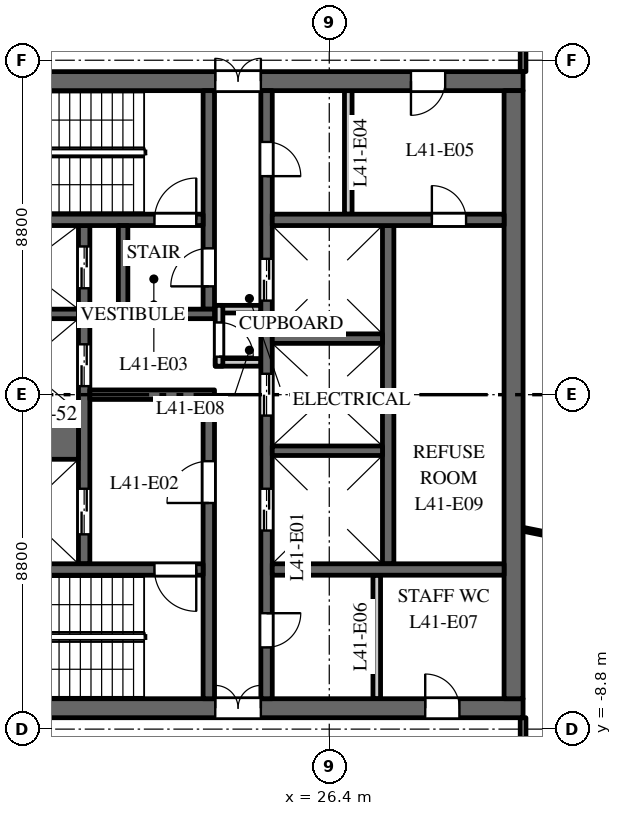
"""IFC4 building model, lengths in metres.
Left out: names, types, materials, properties, quantities, classifications, styles, units other than length and angle.
Written with IfcOpenShell. Run it as: python <this file> out.ifc"""

import sys

from ifc_helpers import new_model, si_unit, direction, frame, frame_2d, origin, place, context, subcontext, project, spatial, rectangle, extrude, element, fill, save


model = new_model("IFC4")
c1 = context("Model", 3, precision=1e-05, world=origin(), true_north=direction((0.0, 1.0)))
c2 = subcontext(c1, "Body", "Model", "MODEL_VIEW")
j1 = project(units=[si_unit("LENGTHUNIT", "METRE"), si_unit("PLANEANGLEUNIT", "RADIAN")], contexts=[c1])
p1 = place(None, origin())
s1 = spatial("IfcSite", under=j1, at=p1, CompositionType="ELEMENT")
p2 = place(p1, origin())
s2 = spatial("IfcBuilding", under=s1, at=p2, CompositionType="ELEMENT")
p3 = place(p2, frame((0.0, 0.0, 178.0)))
s3 = spatial("IfcBuildingStorey", under=s2, at=p3, CompositionType="ELEMENT", Elevation=178.0)
p4 = place(p3, frame((16.5, 8.25, 0.0), z_axis=(0.0, 0.0, 1.0), x_axis=(1.0, 0.0, 0.0)))
e1 = element("IfcWall", 1, at=p4, inside=s3, PredefinedType="SHEAR", context=c2, shape_type="SweptSolid", body=[
    extrude(rectangle(XDim=15.0, YDim=0.5, at=frame_2d((7.5, 0.0))), origin(), (0.0, 0.0, 1.0), 3.7),
])
p5 = place(p4, frame((6.9, 0.0, 0.0)))
e2 = element("IfcOpeningElement", 2, at=p5, cuts=e1, PredefinedType="OPENING", context=c2, shape_type="SweptSolid", body=[
    extrude(rectangle(XDim=1.2, YDim=2.1, at=frame_2d((0.6, 1.05))), frame((0.0, 0.26, 0.0), z_axis=(0.0, -1.0, 0.0), x_axis=(1.0, 0.0, 0.0)), (0.0, 0.0, 1.0), 0.52),
])
p6 = place(p4, frame((12.05, 0.0, 0.0)))
e3 = element("IfcOpeningElement", 3, at=p6, cuts=e1, PredefinedType="OPENING", context=c2, shape_type="SweptSolid", body=[
    extrude(rectangle(XDim=0.9, YDim=2.1, at=frame_2d((0.45, 1.05))), frame((0.0, 0.26, 0.0), z_axis=(0.0, -1.0, 0.0), x_axis=(1.0, 0.0, 0.0)), (0.0, 0.0, 1.0), 0.52),
])
p7 = place(p3, frame((16.5, -8.25, 0.0), z_axis=(0.0, 0.0, 1.0), x_axis=(1.0, 0.0, 0.0)))
e4 = element("IfcWall", 4, at=p7, inside=s3, PredefinedType="SHEAR", context=c2, shape_type="SweptSolid", body=[
    extrude(rectangle(XDim=15.0, YDim=0.5, at=frame_2d((7.5, 0.0))), origin(), (0.0, 0.0, 1.0), 3.7),
])
p8 = place(p7, frame((6.9, 0.0, 0.0)))
e5 = element("IfcOpeningElement", 5, at=p8, cuts=e4, PredefinedType="OPENING", context=c2, shape_type="SweptSolid", body=[
    extrude(rectangle(XDim=1.2, YDim=2.1, at=frame_2d((0.6, 1.05))), frame((0.0, 0.26, 0.0), z_axis=(0.0, -1.0, 0.0), x_axis=(1.0, 0.0, 0.0)), (0.0, 0.0, 1.0), 0.52),
])
p9 = place(p7, frame((12.425, 0.0, 0.0)))
e6 = element("IfcOpeningElement", 6, at=p9, cuts=e4, PredefinedType="OPENING", context=c2, shape_type="SweptSolid", body=[
    extrude(rectangle(XDim=0.9, YDim=2.1, at=frame_2d((0.45, 1.05))), frame((0.0, 0.26, 0.0), z_axis=(0.0, -1.0, 0.0), x_axis=(1.0, 0.0, 0.0)), (0.0, 0.0, 1.0), 0.52),
])
p10 = place(p3, frame((27.95, -4.45, 0.0), z_axis=(0.0, 0.0, 1.0), x_axis=(0.0, 1.0, 0.0)))
e7 = element("IfcWall", 7, at=p10, inside=s3, PredefinedType="SHEAR", context=c2, shape_type="SweptSolid", body=[
    extrude(rectangle(XDim=8.9, YDim=0.3, at=frame_2d((4.45, 0.0))), origin(), (0.0, 0.0, 1.0), 3.7),
])
p11 = place(p3, frame((19.95, -4.45, 0.0), z_axis=(0.0, 0.0, 1.0), x_axis=(0.0, 1.0, 0.0)))
e8 = element("IfcWall", 8, at=p11, inside=s3, PredefinedType="SHEAR", context=c2, shape_type="SweptSolid", body=[
    extrude(rectangle(XDim=8.9, YDim=0.3, at=frame_2d((4.45, 0.0))), origin(), (0.0, 0.0, 1.0), 3.7),
])
p12 = place(p11, frame((0.775, 0.0, 0.0)))
e9 = element("IfcOpeningElement", 9, at=p12, cuts=e8, PredefinedType="OPENING", context=c2, shape_type="SweptSolid", body=[
    extrude(rectangle(XDim=1.2, YDim=2.1, at=frame_2d((0.6, 1.05))), frame((0.0, 0.16, 0.0), z_axis=(0.0, -1.0, 0.0), x_axis=(1.0, 0.0, 0.0)), (0.0, 0.0, 1.0), 0.32),
])
p13 = place(p11, frame((4.675, 0.0, 0.0)))
e10 = element("IfcOpeningElement", 10, at=p13, cuts=e8, PredefinedType="OPENING", context=c2, shape_type="SweptSolid", body=[
    extrude(rectangle(XDim=1.1, YDim=2.1, at=frame_2d((0.55, 1.05))), frame((0.0, 0.16, 0.0), z_axis=(0.0, -1.0, 0.0), x_axis=(1.0, 0.0, 0.0)), (0.0, 0.0, 1.0), 0.32),
])
p14 = place(p11, frame((7.25, 0.0, 0.0)))
e11 = element("IfcOpeningElement", 11, at=p14, cuts=e8, PredefinedType="OPENING", context=c2, shape_type="SweptSolid", body=[
    extrude(rectangle(XDim=1.1, YDim=2.1, at=frame_2d((0.55, 1.05))), frame((0.0, 0.16, 0.0), z_axis=(0.0, -1.0, 0.0), x_axis=(1.0, 0.0, 0.0)), (0.0, 0.0, 1.0), 0.32),
])
p15 = place(p3, frame((24.75, -8.0, 0.0), z_axis=(0.0, 0.0, 1.0), x_axis=(0.0, 1.0, 0.0)))
e12 = element("IfcWall", 12, at=p15, inside=s3, PredefinedType="SHEAR", context=c2, shape_type="SweptSolid", body=[
    extrude(rectangle(XDim=16.0, YDim=0.3, at=frame_2d((8.0, 0.0))), origin(), (0.0, 0.0, 1.0), 3.7),
])
p16 = place(p15, frame((4.425, 0.0, 0.0)))
e13 = element("IfcOpeningElement", 13, at=p16, cuts=e12, PredefinedType="OPENING", context=c2, shape_type="SweptSolid", body=[
    extrude(rectangle(XDim=1.1, YDim=2.1, at=frame_2d((0.55, 1.05))), frame((0.0, 0.16, 0.0), z_axis=(0.0, -1.0, 0.0), x_axis=(1.0, 0.0, 0.0)), (0.0, 0.0, 1.0), 0.32),
])
p17 = place(p15, frame((7.45, 0.0, 0.0)))
e14 = element("IfcOpeningElement", 14, at=p17, cuts=e12, PredefinedType="OPENING", context=c2, shape_type="SweptSolid", body=[
    extrude(rectangle(XDim=1.1, YDim=2.1, at=frame_2d((0.55, 1.05))), frame((0.0, 0.16, 0.0), z_axis=(0.0, -1.0, 0.0), x_axis=(1.0, 0.0, 0.0)), (0.0, 0.0, 1.0), 0.32),
])
p18 = place(p15, frame((10.475, 0.0, 0.0)))
e15 = element("IfcOpeningElement", 15, at=p18, cuts=e12, PredefinedType="OPENING", context=c2, shape_type="SweptSolid", body=[
    extrude(rectangle(XDim=1.1, YDim=2.1, at=frame_2d((0.55, 1.05))), frame((0.0, 0.16, 0.0), z_axis=(0.0, -1.0, 0.0), x_axis=(1.0, 0.0, 0.0)), (0.0, 0.0, 1.0), 0.32),
])
p19 = place(p15, frame((13.75, 0.0, 0.0)))
e16 = element("IfcOpeningElement", 16, at=p19, cuts=e12, PredefinedType="OPENING", context=c2, shape_type="SweptSolid", body=[
    extrude(rectangle(XDim=0.9, YDim=2.1, at=frame_2d((0.45, 1.05))), frame((0.0, 0.16, 0.0), z_axis=(0.0, -1.0, 0.0), x_axis=(1.0, 0.0, 0.0)), (0.0, 0.0, 1.0), 0.32),
])
p20 = place(p15, frame((1.35, 0.0, 0.0)))
e17 = element("IfcOpeningElement", 17, at=p20, cuts=e12, PredefinedType="OPENING", context=c2, shape_type="SweptSolid", body=[
    extrude(rectangle(XDim=0.9, YDim=2.1, at=frame_2d((0.45, 1.05))), frame((0.0, 0.16, 0.0), z_axis=(0.0, -1.0, 0.0), x_axis=(1.0, 0.0, 0.0)), (0.0, 0.0, 1.0), 0.32),
])
p21 = place(p3, frame((20.1, 0.0, 0.0), z_axis=(0.0, 0.0, 1.0), x_axis=(1.0, 0.0, 0.0)))
e18 = element("IfcWall", 18, at=p21, inside=s3, PredefinedType="SHEAR", context=c2, shape_type="SweptSolid", body=[
    extrude(rectangle(XDim=3.28, YDim=0.25, at=frame_2d((1.64, 0.0))), origin(), (0.0, 0.0, 1.0), 3.7),
])
for number, where, z_axis, x_axis in (
    (19, (23.4, 0.85, 0.0), (0.0, 0.0, 1.0), (1.0, 0.0, 0.0)),
    (20, (23.4, 2.25, 0.0), (0.0, 0.0, 1.0), (1.0, 0.0, 0.0)),
):
    element("IfcWall", number, at=place(p3, frame(where, z_axis=z_axis, x_axis=x_axis)), inside=s3, PredefinedType="PARTITIONING", context=c2, shape_type="SweptSolid", body=[
        extrude(rectangle(XDim=1.2, YDim=0.2, at=frame_2d((0.6, 0.0))), origin(), (0.0, 0.0, 1.0), 3.7),
    ])
p22 = place(p3, frame((23.5, 0.75, 0.0), z_axis=(0.0, 0.0, 1.0), x_axis=(0.0, 1.0, 0.0)))
e21 = element("IfcWall", 21, at=p22, inside=s3, PredefinedType="PARTITIONING", context=c2, shape_type="SweptSolid", body=[
    extrude(rectangle(XDim=1.6, YDim=0.2, at=frame_2d((0.8, 0.0))), origin(), (0.0, 0.0, 1.0), 3.7),
])
p23 = place(p22, frame((0.25, 0.0, 0.0)))
e22 = element("IfcOpeningElement", 22, at=p23, cuts=e21, PredefinedType="OPENING", context=c2, shape_type="SweptSolid", body=[
    extrude(rectangle(XDim=0.9, YDim=2.1, at=frame_2d((0.45, 1.05))), frame((0.0, 0.11, 0.0), z_axis=(0.0, -1.0, 0.0), x_axis=(1.0, 0.0, 0.0)), (0.0, 0.0, 1.0), 0.22),
])
p24 = place(p3, frame((31.25, -8.0, 0.0), z_axis=(0.0, 0.0, 1.0), x_axis=(0.0, 1.0, 0.0)))
e23 = element("IfcWall", 23, at=p24, inside=s3, PredefinedType="SHEAR", context=c2, shape_type="SweptSolid", body=[
    extrude(rectangle(XDim=16.0, YDim=0.5, at=frame_2d((8.0, 0.0))), origin(), (0.0, 0.0, 1.0), 3.7),
])
p25 = place(p3, frame((24.9, 4.6, 0.0), z_axis=(0.0, 0.0, 1.0), x_axis=(1.0, 0.0, 0.0)))
e24 = element("IfcWall", 24, at=p25, inside=s3, PredefinedType="SHEAR", context=c2, shape_type="SweptSolid", body=[
    extrude(rectangle(XDim=6.1, YDim=0.3, at=frame_2d((3.05, 0.0))), origin(), (0.0, 0.0, 1.0), 3.7),
])
p26 = place(p25, frame((4.2, 0.0, 0.0)))
e25 = element("IfcOpeningElement", 25, at=p26, cuts=e24, PredefinedType="OPENING", context=c2, shape_type="SweptSolid", body=[
    extrude(rectangle(XDim=0.9, YDim=2.1, at=frame_2d((0.45, 1.05))), frame((0.0, 0.16, 0.0), z_axis=(0.0, -1.0, 0.0), x_axis=(1.0, 0.0, 0.0)), (0.0, 0.0, 1.0), 0.32),
])
for number, where, z_axis, x_axis in (
    (26, (26.9, 4.75, 0.0), (0.0, 0.0, 1.0), (0.0, 1.0, 0.0)),
    (27, (27.65, -8.0, 0.0), (0.0, 0.0, 1.0), (0.0, 1.0, 0.0)),
):
    element("IfcWall", number, at=place(p3, frame(where, z_axis=z_axis, x_axis=x_axis)), inside=s3, PredefinedType="PARTITIONING", context=c2, shape_type="SweptSolid", body=[
        extrude(rectangle(XDim=3.25, YDim=0.2, at=frame_2d((1.625, 0.0))), origin(), (0.0, 0.0, 1.0), 3.7),
    ])
p27 = place(p3, frame((24.9, -4.6, 0.0), z_axis=(0.0, 0.0, 1.0), x_axis=(1.0, 0.0, 0.0)))
e28 = element("IfcWall", 28, at=p27, inside=s3, PredefinedType="SHEAR", context=c2, shape_type="SweptSolid", body=[
    extrude(rectangle(XDim=6.1, YDim=0.3, at=frame_2d((3.05, 0.0))), origin(), (0.0, 0.0, 1.0), 3.7),
])
p28 = place(p3, frame((16.9, -1.075, 0.0), z_axis=(0.0, 0.0, 1.0), x_axis=(1.0, 0.0, 0.0)))
e29 = element("IfcWall", 29, at=p28, inside=s3, PredefinedType="SHEAR", context=c2, shape_type="SweptSolid", body=[
    extrude(rectangle(XDim=2.9, YDim=1.25, at=frame_2d((1.45, 0.0))), origin(), (0.0, 0.0, 1.0), 3.7),
])
for number, where, z_axis, x_axis in (
    (30, (16.9, 2.125, 0.0), (0.0, 0.0, 1.0), (1.0, 0.0, 0.0)),
    (31, (24.9, -1.475, 0.0), (0.0, 0.0, 1.0), (1.0, 0.0, 0.0)),
    (32, (24.9, 1.475, 0.0), (0.0, 0.0, 1.0), (1.0, 0.0, 0.0)),
):
    element("IfcWall", number, at=place(p3, frame(where, z_axis=z_axis, x_axis=x_axis)), inside=s3, PredefinedType="SHEAR", context=c2, shape_type="SweptSolid", body=[
        extrude(rectangle(XDim=2.9, YDim=0.25, at=frame_2d((1.45, 0.0))), origin(), (0.0, 0.0, 1.0), 3.7),
    ])
p29 = place(p3, frame((23.23, 2.25, 0.0), z_axis=(0.0, 0.0, 1.0), x_axis=(0.0, 1.0, 0.0)))
e33 = element("IfcWall", 33, at=p29, inside=s3, PredefinedType="SHEAR", context=c2, shape_type="SweptSolid", body=[
    extrude(rectangle(XDim=5.75, YDim=0.3, at=frame_2d((2.875, 0.0))), origin(), (0.0, 0.0, 1.0), 3.7),
])
p30 = place(p29, frame((0.6, 0.0, 0.0)))
e34 = element("IfcOpeningElement", 34, at=p30, cuts=e33, PredefinedType="OPENING", context=c2, shape_type="SweptSolid", body=[
    extrude(rectangle(XDim=1.0, YDim=2.1, at=frame_2d((0.5, 1.05))), frame((0.0, 0.16, 0.0), z_axis=(0.0, -1.0, 0.0), x_axis=(1.0, 0.0, 0.0)), (0.0, 0.0, 1.0), 0.32),
])
p31 = place(p3, frame((23.23, -8.0, 0.0), z_axis=(0.0, 0.0, 1.0), x_axis=(0.0, 1.0, 0.0)))
e35 = element("IfcWall", 35, at=p31, inside=s3, PredefinedType="SHEAR", context=c2, shape_type="SweptSolid", body=[
    extrude(rectangle(XDim=7.875, YDim=0.3, at=frame_2d((3.938, 0.0))), origin(), (0.0, 0.0, 1.0), 3.7),
])
p32 = place(p31, frame((5.15, 0.0, 0.0)))
e36 = element("IfcOpeningElement", 36, at=p32, cuts=e35, PredefinedType="OPENING", context=c2, shape_type="SweptSolid", body=[
    extrude(rectangle(XDim=1.1, YDim=2.1, at=frame_2d((0.55, 1.05))), frame((0.0, 0.16, 0.0), z_axis=(0.0, -1.0, 0.0), x_axis=(1.0, 0.0, 0.0)), (0.0, 0.0, 1.0), 0.32),
])
p33 = place(p3, frame((16.9, 4.6, 0.0), z_axis=(0.0, 0.0, 1.0), x_axis=(1.0, 0.0, 0.0)))
e37 = element("IfcWall", 37, at=p33, inside=s3, PredefinedType="SHEAR", context=c2, shape_type="SweptSolid", body=[
    extrude(rectangle(XDim=6.18, YDim=0.3, at=frame_2d((3.09, 0.0))), origin(), (0.0, 0.0, 1.0), 3.7),
])
p34 = place(p33, frame((4.9, 0.0, 0.0)))
e38 = element("IfcOpeningElement", 38, at=p34, cuts=e37, PredefinedType="OPENING", context=c2, shape_type="SweptSolid", body=[
    extrude(rectangle(XDim=1.1, YDim=2.1, at=frame_2d((0.55, 1.05))), frame((0.0, 0.16, 0.0), z_axis=(0.0, -1.0, 0.0), x_axis=(1.0, 0.0, 0.0)), (0.0, 0.0, 1.0), 0.32),
])
p35 = place(p3, frame((16.9, -4.6, 0.0), z_axis=(0.0, 0.0, 1.0), x_axis=(1.0, 0.0, 0.0)))
e39 = element("IfcWall", 39, at=p35, inside=s3, PredefinedType="SHEAR", context=c2, shape_type="SweptSolid", body=[
    extrude(rectangle(XDim=6.18, YDim=0.3, at=frame_2d((3.09, 0.0))), origin(), (0.0, 0.0, 1.0), 3.7),
])
p36 = place(p35, frame((4.9, 0.0, 0.0)))
e40 = element("IfcOpeningElement", 40, at=p36, cuts=e39, PredefinedType="OPENING", context=c2, shape_type="SweptSolid", body=[
    extrude(rectangle(XDim=1.1, YDim=2.1, at=frame_2d((0.55, 1.05))), frame((0.0, 0.16, 0.0), z_axis=(0.0, -1.0, 0.0), x_axis=(1.0, 0.0, 0.0)), (0.0, 0.0, 1.0), 0.32),
])
p37 = place(p3, frame((20.85, 2.125, 0.0), z_axis=(0.0, 0.0, 1.0), x_axis=(1.0, 0.0, 0.0)))
e41 = element("IfcWall", 41, at=p37, inside=s3, PredefinedType="SHEAR", context=c2, shape_type="SweptSolid", body=[
    extrude(rectangle(XDim=2.53, YDim=0.25, at=frame_2d((1.265, 0.0))), origin(), (0.0, 0.0, 1.0), 3.7),
])
p38 = place(p3, frame((20.975, 2.25, 0.0), z_axis=(0.0, 0.0, 1.0), x_axis=(0.0, 1.0, 0.0)))
e42 = element("IfcWall", 42, at=p38, inside=s3, PredefinedType="SHEAR", context=c2, shape_type="SweptSolid", body=[
    extrude(rectangle(XDim=2.2, YDim=0.25, at=frame_2d((1.1, 0.0))), origin(), (0.0, 0.0, 1.0), 3.7),
])
p39 = place(p3, frame((31.5, -10.7, 0.0), z_axis=(0.0, 0.0, 1.0), x_axis=(0.0, 1.0, 0.0)))
e43 = element("IfcWall", 43, at=p39, inside=s3, PredefinedType="PARTITIONING", context=c2, shape_type="SweptSolid", body=[
    extrude(rectangle(XDim=2.2, YDim=0.15, at=frame_2d((1.1, 0.0))), origin(), (0.0, 0.0, 1.0), 2.9),
])
p40 = place(p3, frame((31.5, -3.542, 0.0), z_axis=(0.0, 0.0, 1.0), x_axis=(0.980357474535, -0.197228857227, 0.0)))
e44 = element("IfcWall", 44, at=p40, inside=s3, PredefinedType="PARTITIONING", context=c2, shape_type="SweptSolid", body=[
    extrude(rectangle(XDim=4.092, YDim=0.1, at=frame_2d((2.046, 0.0))), origin(), (0.0, 0.0, 1.0), 2.9),
])
p41 = place(p3, frame((31.5, 8.5, 0.0), z_axis=(0.0, 0.0, 1.0), x_axis=(0.0, 1.0, 0.0)))
e45 = element("IfcWall", 45, at=p41, inside=s3, PredefinedType="PARTITIONING", context=c2, shape_type="SweptSolid", body=[
    extrude(rectangle(XDim=2.2, YDim=0.15, at=frame_2d((1.1, 0.0))), origin(), (0.0, 0.0, 1.0), 2.9),
])
p42 = place(p41, frame((0.65, 0.0, 0.0)))
e46 = element("IfcOpeningElement", 46, at=p42, cuts=e45, PredefinedType="OPENING", context=c2, shape_type="SweptSolid", body=[
    extrude(rectangle(XDim=1.0, YDim=2.1, at=frame_2d((0.5, 1.05))), frame((0.0, 0.085, 0.0), z_axis=(0.0, -1.0, 0.0), x_axis=(1.0, 0.0, 0.0)), (0.0, 0.0, 1.0), 0.17),
])
p43 = place(p12, origin())
e47 = element("IfcDoor", 47, at=p43, inside=s3, OperationType="DOUBLE_DOOR_SLIDING", PredefinedType="DOOR", context=c2, shape_type="SweptSolid", body=[
    extrude(rectangle(XDim=1.2, YDim=2.1, at=frame_2d((0.6, 1.05))), frame((0.0, 0.025, 0.0), z_axis=(0.0, -1.0, 0.0), x_axis=(1.0, 0.0, 0.0)), (0.0, 0.0, 1.0), 0.05),
])
fill(e9, e47)
p44 = place(p13, origin())
e48 = element("IfcDoor", 48, at=p44, inside=s3, OperationType="DOUBLE_DOOR_SLIDING", PredefinedType="DOOR", context=c2, shape_type="SweptSolid", body=[
    extrude(rectangle(XDim=1.1, YDim=2.1, at=frame_2d((0.55, 1.05))), frame((0.0, 0.025, 0.0), z_axis=(0.0, -1.0, 0.0), x_axis=(1.0, 0.0, 0.0)), (0.0, 0.0, 1.0), 0.05),
])
fill(e10, e48)
p45 = place(p14, origin())
e49 = element("IfcDoor", 49, at=p45, inside=s3, OperationType="DOUBLE_DOOR_SLIDING", PredefinedType="DOOR", context=c2, shape_type="SweptSolid", body=[
    extrude(rectangle(XDim=1.1, YDim=2.1, at=frame_2d((0.55, 1.05))), frame((0.0, 0.025, 0.0), z_axis=(0.0, -1.0, 0.0), x_axis=(1.0, 0.0, 0.0)), (0.0, 0.0, 1.0), 0.05),
])
fill(e11, e49)
p46 = place(p16, origin())
e50 = element("IfcDoor", 50, at=p46, inside=s3, OperationType="DOUBLE_DOOR_SLIDING", PredefinedType="DOOR", context=c2, shape_type="SweptSolid", body=[
    extrude(rectangle(XDim=1.1, YDim=2.1, at=frame_2d((0.55, 1.05))), frame((0.0, 0.025, 0.0), z_axis=(0.0, -1.0, 0.0), x_axis=(1.0, 0.0, 0.0)), (0.0, 0.0, 1.0), 0.05),
])
fill(e13, e50)
p47 = place(p17, origin())
e51 = element("IfcDoor", 51, at=p47, inside=s3, OperationType="DOUBLE_DOOR_SLIDING", PredefinedType="DOOR", context=c2, shape_type="SweptSolid", body=[
    extrude(rectangle(XDim=1.1, YDim=2.1, at=frame_2d((0.55, 1.05))), frame((0.0, 0.025, 0.0), z_axis=(0.0, -1.0, 0.0), x_axis=(1.0, 0.0, 0.0)), (0.0, 0.0, 1.0), 0.05),
])
fill(e14, e51)
p48 = place(p18, origin())
e52 = element("IfcDoor", 52, at=p48, inside=s3, OperationType="DOUBLE_DOOR_SLIDING", PredefinedType="DOOR", context=c2, shape_type="SweptSolid", body=[
    extrude(rectangle(XDim=1.1, YDim=2.1, at=frame_2d((0.55, 1.05))), frame((0.0, 0.025, 0.0), z_axis=(0.0, -1.0, 0.0), x_axis=(1.0, 0.0, 0.0)), (0.0, 0.0, 1.0), 0.05),
])
fill(e15, e52)
p49 = place(p34, origin())
e53 = element("IfcDoor", 53, at=p49, inside=s3, OperationType="SINGLE_SWING_LEFT", PredefinedType="DOOR", context=c2, shape_type="SweptSolid", body=[
    extrude(rectangle(XDim=1.1, YDim=2.1, at=frame_2d((0.55, 1.05))), frame((0.0, 0.025, 0.0), z_axis=(0.0, -1.0, 0.0), x_axis=(1.0, 0.0, 0.0)), (0.0, 0.0, 1.0), 0.05),
])
fill(e38, e53)
p50 = place(p36, origin())
e54 = element("IfcDoor", 54, at=p50, inside=s3, OperationType="SINGLE_SWING_RIGHT", PredefinedType="DOOR", context=c2, shape_type="SweptSolid", body=[
    extrude(rectangle(XDim=1.1, YDim=2.1, at=frame_2d((0.55, 1.05))), frame((0.0, 0.025, 0.0), z_axis=(0.0, -1.0, 0.0), x_axis=(1.0, 0.0, 0.0)), (0.0, 0.0, 1.0), 0.05),
])
fill(e40, e54)
p51 = place(p32, origin())
e55 = element("IfcDoor", 55, at=p51, inside=s3, OperationType="SINGLE_SWING_RIGHT", PredefinedType="DOOR", context=c2, shape_type="SweptSolid", body=[
    extrude(rectangle(XDim=1.1, YDim=2.1, at=frame_2d((0.55, 1.05))), frame((0.0, 0.025, 0.0), z_axis=(0.0, -1.0, 0.0), x_axis=(1.0, 0.0, 0.0)), (0.0, 0.0, 1.0), 0.05),
])
fill(e36, e55)
p52 = place(p30, origin())
e56 = element("IfcDoor", 56, at=p52, inside=s3, OperationType="SINGLE_SWING_RIGHT", PredefinedType="DOOR", context=c2, shape_type="SweptSolid", body=[
    extrude(rectangle(XDim=1.0, YDim=2.1, at=frame_2d((0.5, 1.05))), frame((0.0, 0.025, 0.0), z_axis=(0.0, -1.0, 0.0), x_axis=(1.0, 0.0, 0.0)), (0.0, 0.0, 1.0), 0.05),
])
fill(e34, e56)
p53 = place(p5, origin())
e57 = element("IfcDoor", 57, at=p53, inside=s3, OperationType="DOUBLE_DOOR_DOUBLE_SWING", PredefinedType="DOOR", context=c2, shape_type="SweptSolid", body=[
    extrude(rectangle(XDim=1.2, YDim=2.1, at=frame_2d((0.6, 1.05))), frame((0.0, 0.025, 0.0), z_axis=(0.0, -1.0, 0.0), x_axis=(1.0, 0.0, 0.0)), (0.0, 0.0, 1.0), 0.05),
])
fill(e2, e57)
p54 = place(p8, origin())
e58 = element("IfcDoor", 58, at=p54, inside=s3, OperationType="DOUBLE_DOOR_DOUBLE_SWING", PredefinedType="DOOR", context=c2, shape_type="SweptSolid", body=[
    extrude(rectangle(XDim=1.2, YDim=2.1, at=frame_2d((0.6, 1.05))), frame((0.0, 0.025, 0.0), z_axis=(0.0, -1.0, 0.0), x_axis=(1.0, 0.0, 0.0)), (0.0, 0.0, 1.0), 0.05),
])
fill(e5, e58)
p55 = place(p19, origin())
e59 = element("IfcDoor", 59, at=p55, inside=s3, OperationType="SINGLE_SWING_LEFT", PredefinedType="DOOR", context=c2, shape_type="SweptSolid", body=[
    extrude(rectangle(XDim=0.9, YDim=2.1, at=frame_2d((0.45, 1.05))), frame((0.0, 0.025, 0.0), z_axis=(0.0, -1.0, 0.0), x_axis=(1.0, 0.0, 0.0)), (0.0, 0.0, 1.0), 0.05),
])
fill(e16, e59)
p56 = place(p6, origin())
e60 = element("IfcDoor", 60, at=p56, inside=s3, OperationType="SINGLE_SWING_LEFT", PredefinedType="DOOR", context=c2, shape_type="SweptSolid", body=[
    extrude(rectangle(XDim=0.9, YDim=2.1, at=frame_2d((0.45, 1.05))), frame((0.0, 0.025, 0.0), z_axis=(0.0, -1.0, 0.0), x_axis=(1.0, 0.0, 0.0)), (0.0, 0.0, 1.0), 0.05),
])
fill(e3, e60)
p57 = place(p20, origin())
e61 = element("IfcDoor", 61, at=p57, inside=s3, OperationType="SINGLE_SWING_RIGHT", PredefinedType="DOOR", context=c2, shape_type="SweptSolid", body=[
    extrude(rectangle(XDim=0.9, YDim=2.1, at=frame_2d((0.45, 1.05))), frame((0.0, 0.025, 0.0), z_axis=(0.0, -1.0, 0.0), x_axis=(1.0, 0.0, 0.0)), (0.0, 0.0, 1.0), 0.05),
])
fill(e17, e61)
p58 = place(p9, origin())
e62 = element("IfcDoor", 62, at=p58, inside=s3, OperationType="SINGLE_SWING_RIGHT", PredefinedType="DOOR", context=c2, shape_type="SweptSolid", body=[
    extrude(rectangle(XDim=0.9, YDim=2.1, at=frame_2d((0.45, 1.05))), frame((0.0, 0.025, 0.0), z_axis=(0.0, -1.0, 0.0), x_axis=(1.0, 0.0, 0.0)), (0.0, 0.0, 1.0), 0.05),
])
fill(e6, e62)
p59 = place(p23, origin())
e63 = element("IfcDoor", 63, at=p59, inside=s3, OperationType="SINGLE_SWING_LEFT", PredefinedType="DOOR", context=c2, shape_type="SweptSolid", body=[
    extrude(rectangle(XDim=0.9, YDim=2.1, at=frame_2d((0.45, 1.05))), frame((0.0, 0.025, 0.0), z_axis=(0.0, -1.0, 0.0), x_axis=(1.0, 0.0, 0.0)), (0.0, 0.0, 1.0), 0.05),
])
fill(e22, e63)
p60 = place(p26, origin())
e64 = element("IfcDoor", 64, at=p60, inside=s3, OperationType="SINGLE_SWING_RIGHT", PredefinedType="DOOR", context=c2, shape_type="SweptSolid", body=[
    extrude(rectangle(XDim=0.9, YDim=2.1, at=frame_2d((0.45, 1.05))), frame((0.0, 0.025, 0.0), z_axis=(0.0, -1.0, 0.0), x_axis=(1.0, 0.0, 0.0)), (0.0, 0.0, 1.0), 0.05),
])
fill(e25, e64)
save(model, sys.argv[1])
